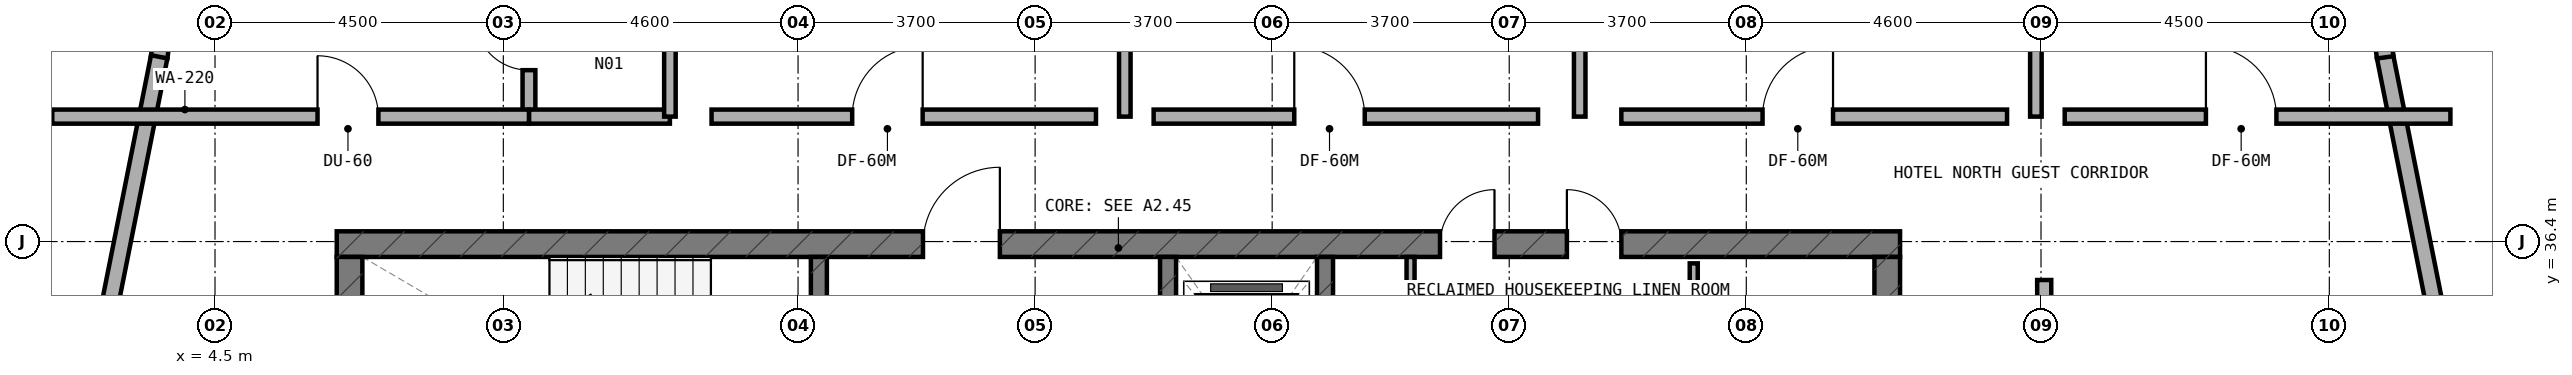
"""IFC4 building model, lengths in metres.
Left out: names, types, materials, properties, quantities, classifications, styles, units other than length and angle.
Written with IfcOpenShell. Run it as: python <this file> out.ifc"""

import sys

from ifc_helpers import new_model, si_unit, direction, frame, frame_2d, origin, place, context, subcontext, project, spatial, rectangle, extrude, element, fill, save


model = new_model("IFC4")
c1 = context("Model", 3, precision=1e-05, world=origin(), true_north=direction((0.0, 1.0)))
c2 = subcontext(c1, "Body", "Model", "MODEL_VIEW")
j1 = project(units=[si_unit("LENGTHUNIT", "METRE"), si_unit("PLANEANGLEUNIT", "RADIAN")], contexts=[c1])
p1 = place(None, origin())
s1 = spatial("IfcSite", under=j1, at=p1, CompositionType="ELEMENT")
p2 = place(p1, origin())
s2 = spatial("IfcBuilding", under=s1, at=p2, CompositionType="ELEMENT")
p3 = place(p2, frame((0.0, 0.0, 209.9)))
s3 = spatial("IfcBuildingStorey", under=s2, at=p3, CompositionType="ELEMENT", Elevation=209.9)
p4 = place(p3, frame((6.4, 36.36, 0.0), z_axis=(0.0, 0.0, 1.0), x_axis=(1.0, 0.0, 0.0)))
e1 = element("IfcWall", 1, at=p4, inside=s3, PredefinedType="SHEAR", context=c2, shape_type="SweptSolid", body=[
    extrude(rectangle(XDim=24.4, YDim=0.4, at=frame_2d((12.2, 0.0))), origin(), (0.0, 0.0, 1.0), 3.6),
])
p5 = place(p4, frame((9.15, 0.0, 0.0)))
e2 = element("IfcOpeningElement", 2, at=p5, cuts=e1, PredefinedType="OPENING", context=c2, shape_type="SweptSolid", body=[
    extrude(rectangle(XDim=1.2, YDim=2.15, at=frame_2d((0.6, 1.075))), frame((0.0, 0.21, 0.0), z_axis=(0.0, -1.0, 0.0), x_axis=(1.0, 0.0, 0.0)), (0.0, 0.0, 1.0), 0.42),
])
p6 = place(p4, frame((19.2, 0.0, 0.0)))
e3 = element("IfcOpeningElement", 3, at=p6, cuts=e1, PredefinedType="OPENING", context=c2, shape_type="SweptSolid", body=[
    extrude(rectangle(XDim=0.85, YDim=2.1, at=frame_2d((0.425, 1.05))), frame((0.0, 0.21, 0.0), z_axis=(0.0, -1.0, 0.0), x_axis=(1.0, 0.0, 0.0)), (0.0, 0.0, 1.0), 0.42),
])
p7 = place(p4, frame((17.22, 0.0, 0.0)))
e4 = element("IfcOpeningElement", 4, at=p7, cuts=e1, PredefinedType="OPENING", context=c2, shape_type="SweptSolid", body=[
    extrude(rectangle(XDim=0.85, YDim=2.1, at=frame_2d((0.425, 1.05))), frame((0.0, 0.21, 0.0), z_axis=(0.0, -1.0, 0.0), x_axis=(1.0, 0.0, 0.0)), (0.0, 0.0, 1.0), 0.42),
])
for number, where, z_axis, x_axis in (
    (5, (6.6, 33.0, 0.0), (0.0, 0.0, 1.0), (0.0, 1.0, 0.0)),
    (6, (30.6, 33.0, 0.0), (0.0, 0.0, 1.0), (0.0, 1.0, 0.0)),
):
    element("IfcWall", number, at=place(p3, frame(where, z_axis=z_axis, x_axis=x_axis)), inside=s3, PredefinedType="SHEAR", context=c2, shape_type="SweptSolid", body=[
        extrude(rectangle(XDim=3.16, YDim=0.4, at=frame_2d((1.58, 0.0))), origin(), (0.0, 0.0, 1.0), 3.6),
    ])
p8 = place(p3, frame((13.925, 33.0, 0.0), z_axis=(0.0, 0.0, 1.0), x_axis=(0.0, 1.0, 0.0)))
e7 = element("IfcWall", 7, at=p8, inside=s3, PredefinedType="STANDARD", context=c2, shape_type="SweptSolid", body=[
    extrude(rectangle(XDim=3.16, YDim=0.25, at=frame_2d((1.58, 0.0))), origin(), (0.0, 0.0, 1.0), 3.32),
])
p9 = place(p8, frame((0.98, 0.0, 0.0)))
e8 = element("IfcOpeningElement", 8, at=p9, cuts=e7, PredefinedType="OPENING", context=c2, shape_type="SweptSolid", body=[
    extrude(rectangle(XDim=1.1, YDim=2.15, at=frame_2d((0.55, 1.075))), frame((0.0, 0.135, 0.0), z_axis=(0.0, -1.0, 0.0), x_axis=(1.0, 0.0, 0.0)), (0.0, 0.0, 1.0), 0.27),
])
p10 = place(p3, frame((19.375, 33.0, 0.0), z_axis=(0.0, 0.0, 1.0), x_axis=(0.0, 1.0, 0.0)))
e9 = element("IfcWall", 9, at=p10, inside=s3, PredefinedType="STANDARD", context=c2, shape_type="SweptSolid", body=[
    extrude(rectangle(XDim=3.16, YDim=0.25, at=frame_2d((1.58, 0.0))), origin(), (0.0, 0.0, 1.0), 3.32),
])
p11 = place(p10, frame((0.98, 0.0, 0.0)))
e10 = element("IfcOpeningElement", 10, at=p11, cuts=e9, PredefinedType="OPENING", context=c2, shape_type="SweptSolid", body=[
    extrude(rectangle(XDim=1.1, YDim=2.15, at=frame_2d((0.55, 1.075))), frame((0.0, 0.135, 0.0), z_axis=(0.0, -1.0, 0.0), x_axis=(1.0, 0.0, 0.0)), (0.0, 0.0, 1.0), 0.27),
])
p12 = place(p3, frame((21.825, 33.0, 0.0), z_axis=(0.0, 0.0, 1.0), x_axis=(0.0, 1.0, 0.0)))
e11 = element("IfcWall", 11, at=p12, inside=s3, PredefinedType="STANDARD", context=c2, shape_type="SweptSolid", body=[
    extrude(rectangle(XDim=3.16, YDim=0.25, at=frame_2d((1.58, 0.0))), origin(), (0.0, 0.0, 1.0), 3.32),
])
p13 = place(p3, frame((40.084, 30.681, 0.0), z_axis=(0.0, 0.0, 1.0), x_axis=(-0.195291715883, 0.980745199176, 0.0)))
e12 = element("IfcWall", 12, at=p13, inside=s3, PredefinedType="STANDARD", context=c2, shape_type="SweptSolid", body=[
    extrude(rectangle(XDim=8.771, YDim=0.26, at=frame_2d((4.385, 0.0))), origin(), (0.0, 0.0, 1.0), 3.32),
])
p14 = place(p13, frame((2.798, 0.0, 0.85)))
e13 = element("IfcOpeningElement", 13, at=p14, cuts=e12, PredefinedType="OPENING", context=c2, shape_type="SweptSolid", body=[
    extrude(rectangle(XDim=2.1, YDim=1.5, at=frame_2d((1.05, 0.75))), frame((0.0, 0.14, 0.0), z_axis=(0.0, -1.0, 0.0), x_axis=(1.0, 0.0, 0.0)), (0.0, 0.0, 1.0), 0.28),
])
p15 = place(p3, frame((38.372, 39.275, 0.0), z_axis=(0.0, 0.0, 1.0), x_axis=(-0.130954667764, 0.9913883573, 0.0)))
e14 = element("IfcWall", 14, at=p15, inside=s3, PredefinedType="STANDARD", context=c2, shape_type="SweptSolid", body=[
    extrude(rectangle(XDim=0.833, YDim=0.26, at=frame_2d((0.417, 0.0))), origin(), (0.0, 0.0, 1.0), 3.32),
])
p16 = place(p3, frame((3.741, 40.136, 0.0), z_axis=(0.0, 0.0, 1.0), x_axis=(-0.130156359936, -0.991493480548, 0.0)))
e15 = element("IfcWall", 15, at=p16, inside=s3, PredefinedType="STANDARD", context=c2, shape_type="SweptSolid", body=[
    extrude(rectangle(XDim=0.868, YDim=0.26, at=frame_2d((0.434, 0.0))), origin(), (0.0, 0.0, 1.0), 3.32),
])
p17 = place(p3, frame((3.629, 39.283, 0.0), z_axis=(0.0, 0.0, 1.0), x_axis=(-0.195291715883, -0.980745199176, 0.0)))
e16 = element("IfcWall", 16, at=p17, inside=s3, PredefinedType="STANDARD", context=c2, shape_type="SweptSolid", body=[
    extrude(rectangle(XDim=8.771, YDim=0.26, at=frame_2d((4.385, 0.0))), origin(), (0.0, 0.0, 1.0), 3.32),
])
p18 = place(p17, frame((3.873, 0.0, 0.85)))
e17 = element("IfcOpeningElement", 17, at=p18, cuts=e16, PredefinedType="OPENING", context=c2, shape_type="SweptSolid", body=[
    extrude(rectangle(XDim=2.1, YDim=1.5, at=frame_2d((1.05, 0.75))), frame((0.0, 0.14, 0.0), z_axis=(0.0, -1.0, 0.0), x_axis=(1.0, 0.0, 0.0)), (0.0, 0.0, 1.0), 0.28),
])
p19 = place(p3, frame((27.58, 33.1, 0.0), z_axis=(0.0, 0.0, 1.0), x_axis=(0.0, 1.0, 0.0)))
e18 = element("IfcWall", 18, at=p19, inside=s3, PredefinedType="PARTITIONING", context=c2, shape_type="SweptSolid", body=[
    extrude(rectangle(XDim=2.96, YDim=0.125, at=frame_2d((1.48, 0.0))), origin(), (0.0, 0.0, 1.0), 3.32),
])
p20 = place(p19, frame((1.055, 0.0, 0.0)))
e19 = element("IfcOpeningElement", 19, at=p20, cuts=e18, PredefinedType="OPENING", context=c2, shape_type="SweptSolid", body=[
    extrude(rectangle(XDim=0.85, YDim=2.1, at=frame_2d((0.425, 1.05))), frame((0.0, 0.073, 0.0), z_axis=(0.0, -1.0, 0.0), x_axis=(1.0, 0.0, 0.0)), (0.0, 0.0, 1.0), 0.145),
])
p21 = place(p3, frame((23.16, 34.82, 0.0), z_axis=(0.0, 0.0, 1.0), x_axis=(0.0, 1.0, 0.0)))
e20 = element("IfcWall", 20, at=p21, inside=s3, PredefinedType="PARTITIONING", context=c2, shape_type="SweptSolid", body=[
    extrude(rectangle(XDim=1.34, YDim=0.125, at=frame_2d((0.67, 0.0))), origin(), (0.0, 0.0, 1.0), 3.32),
])
p22 = place(p3, frame((9.4, 38.45, 0.0), z_axis=(0.0, 0.0, 1.0), x_axis=(0.0, 1.0, 0.0)))
e21 = element("IfcWall", 21, at=p22, inside=s3, PredefinedType="PLUMBINGWALL", context=c2, shape_type="SweptSolid", body=[
    extrude(rectangle(XDim=2.1, YDim=0.2, at=frame_2d((1.05, 0.0))), origin(), (0.0, 0.0, 1.0), 2.935),
])
p23 = place(p22, frame((0.625, 0.0, 0.0)))
e22 = element("IfcOpeningElement", 22, at=p23, cuts=e21, PredefinedType="OPENING", context=c2, shape_type="SweptSolid", body=[
    extrude(rectangle(XDim=0.85, YDim=2.1, at=frame_2d((0.425, 1.05))), frame((0.0, 0.11, 0.0), z_axis=(0.0, -1.0, 0.0), x_axis=(1.0, 0.0, 0.0)), (0.0, 0.0, 1.0), 0.22),
])
p24 = place(p3, frame((9.4, 38.35, 0.0), z_axis=(0.0, 0.0, 1.0), x_axis=(1.0, 0.0, 0.0)))
e23 = element("IfcWall", 23, at=p24, inside=s3, PredefinedType="SOLIDWALL", context=c2, shape_type="SweptSolid", body=[
    extrude(rectangle(XDim=2.2, YDim=0.22, at=frame_2d((1.1, 0.0))), origin(), (0.0, 0.0, 1.0), 3.32),
])
p25 = place(p3, frame((1.96, 38.35, 0.0), z_axis=(0.0, 0.0, 1.0), x_axis=(1.0, 0.0, 0.0)))
e24 = element("IfcWall", 24, at=p25, inside=s3, PredefinedType="SOLIDWALL", context=c2, shape_type="SweptSolid", body=[
    extrude(rectangle(XDim=7.44, YDim=0.22, at=frame_2d((3.72, 0.0))), origin(), (0.0, 0.0, 1.0), 2.695),
])
p26 = place(p25, frame((4.14, 0.0, 0.0)))
e25 = element("IfcOpeningElement", 25, at=p26, cuts=e24, PredefinedType="OPENING", context=c2, shape_type="SweptSolid", body=[
    extrude(rectangle(XDim=0.95, YDim=2.1, at=frame_2d((0.475, 1.05))), frame((0.0, 0.12, 0.0), z_axis=(0.0, -1.0, 0.0), x_axis=(1.0, 0.0, 0.0)), (0.0, 0.0, 1.0), 0.24),
])
p27 = place(p3, frame((11.6, 38.35, 0.0), z_axis=(0.0, 0.0, 1.0), x_axis=(0.0, 1.0, 0.0)))
e26 = element("IfcWall", 26, at=p27, inside=s3, PredefinedType="SOLIDWALL", context=c2, shape_type="SweptSolid", body=[
    extrude(rectangle(XDim=5.064, YDim=0.18, at=frame_2d((2.532, 0.0))), origin(), (0.0, 0.0, 1.0), 2.935),
])
p28 = place(p3, frame((18.7, 38.35, 0.0), z_axis=(0.0, 0.0, 1.0), x_axis=(0.0, 1.0, 0.0)))
e27 = element("IfcWall", 27, at=p28, inside=s3, PredefinedType="SOLIDWALL", context=c2, shape_type="SweptSolid", body=[
    extrude(rectangle(XDim=5.79, YDim=0.18, at=frame_2d((2.895, 0.0))), origin(), (0.0, 0.0, 1.0), 2.935),
])
p29 = place(p3, frame((12.25, 38.35, 0.0), z_axis=(0.0, 0.0, 1.0), x_axis=(1.0, 0.0, 0.0)))
e28 = element("IfcWall", 28, at=p29, inside=s3, PredefinedType="SOLIDWALL", context=c2, shape_type="SweptSolid", body=[
    extrude(rectangle(XDim=6.0, YDim=0.22, at=frame_2d((3.0, 0.0))), origin(), (0.0, 0.0, 1.0), 2.695),
])
p30 = place(p29, frame((2.195, 0.0, 0.0)))
e29 = element("IfcOpeningElement", 29, at=p30, cuts=e28, PredefinedType="OPENING", context=c2, shape_type="SweptSolid", body=[
    extrude(rectangle(XDim=1.1, YDim=2.1, at=frame_2d((0.55, 1.05))), frame((0.0, 0.12, 0.0), z_axis=(0.0, -1.0, 0.0), x_axis=(1.0, 0.0, 0.0)), (0.0, 0.0, 1.0), 0.24),
])
p31 = place(p3, frame((19.15, 38.35, 0.0), z_axis=(0.0, 0.0, 1.0), x_axis=(1.0, 0.0, 0.0)))
e30 = element("IfcWall", 30, at=p31, inside=s3, PredefinedType="SOLIDWALL", context=c2, shape_type="SweptSolid", body=[
    extrude(rectangle(XDim=6.0, YDim=0.22, at=frame_2d((3.0, 0.0))), origin(), (0.0, 0.0, 1.0), 3.32),
])
p32 = place(p31, frame((2.195, 0.0, 0.0)))
e31 = element("IfcOpeningElement", 31, at=p32, cuts=e30, PredefinedType="OPENING", context=c2, shape_type="SweptSolid", body=[
    extrude(rectangle(XDim=1.1, YDim=2.1, at=frame_2d((0.55, 1.05))), frame((0.0, 0.12, 0.0), z_axis=(0.0, -1.0, 0.0), x_axis=(1.0, 0.0, 0.0)), (0.0, 0.0, 1.0), 0.24),
])
p33 = place(p3, frame((25.8, 38.35, 0.0), z_axis=(0.0, 0.0, 1.0), x_axis=(0.0, 1.0, 0.0)))
e32 = element("IfcWall", 32, at=p33, inside=s3, PredefinedType="SOLIDWALL", context=c2, shape_type="SweptSolid", body=[
    extrude(rectangle(XDim=5.79, YDim=0.18, at=frame_2d((2.895, 0.0))), origin(), (0.0, 0.0, 1.0), 2.695),
])
p34 = place(p3, frame((32.92, 38.35, 0.0), z_axis=(0.0, 0.0, 1.0), x_axis=(0.0, 1.0, 0.0)))
e33 = element("IfcWall", 33, at=p34, inside=s3, PredefinedType="SOLIDWALL", context=c2, shape_type="SweptSolid", body=[
    extrude(rectangle(XDim=4.563, YDim=0.18, at=frame_2d((2.281, 0.0))), origin(), (0.0, 0.0, 1.0), 2.935),
])
p35 = place(p3, frame((26.45, 38.35, 0.0), z_axis=(0.0, 0.0, 1.0), x_axis=(1.0, 0.0, 0.0)))
e34 = element("IfcWall", 34, at=p35, inside=s3, PredefinedType="SOLIDWALL", context=c2, shape_type="SweptSolid", body=[
    extrude(rectangle(XDim=6.02, YDim=0.22, at=frame_2d((3.01, 0.0))), origin(), (0.0, 0.0, 1.0), 2.695),
])
p36 = place(p35, frame((2.204, 0.0, 0.0)))
e35 = element("IfcOpeningElement", 35, at=p36, cuts=e34, PredefinedType="OPENING", context=c2, shape_type="SweptSolid", body=[
    extrude(rectangle(XDim=1.1, YDim=2.1, at=frame_2d((0.55, 1.05))), frame((0.0, 0.12, 0.0), z_axis=(0.0, -1.0, 0.0), x_axis=(1.0, 0.0, 0.0)), (0.0, 0.0, 1.0), 0.24),
])
p37 = place(p3, frame((33.37, 38.35, 0.0), z_axis=(0.0, 0.0, 1.0), x_axis=(1.0, 0.0, 0.0)))
e36 = element("IfcWall", 36, at=p37, inside=s3, PredefinedType="SOLIDWALL", context=c2, shape_type="SweptSolid", body=[
    extrude(rectangle(XDim=6.02, YDim=0.22, at=frame_2d((3.01, 0.0))), origin(), (0.0, 0.0, 1.0), 2.695),
])
p38 = place(p37, frame((2.204, 0.0, 0.0)))
e37 = element("IfcOpeningElement", 37, at=p38, cuts=e36, PredefinedType="OPENING", context=c2, shape_type="SweptSolid", body=[
    extrude(rectangle(XDim=1.1, YDim=2.1, at=frame_2d((0.55, 1.05))), frame((0.0, 0.12, 0.0), z_axis=(0.0, -1.0, 0.0), x_axis=(1.0, 0.0, 0.0)), (0.0, 0.0, 1.0), 0.24),
])
p39 = place(p3, frame((33.05, 31.088, 0.0), z_axis=(0.0, 0.0, 1.0), x_axis=(0.0, 1.0, 0.0)))
e38 = element("IfcWall", 38, at=p39, inside=s3, PredefinedType="SOLIDWALL", context=c2, shape_type="SweptSolid", body=[
    extrude(rectangle(XDim=4.712, YDim=0.22, at=frame_2d((2.356, 0.0))), origin(), (0.0, 0.0, 1.0), 2.695),
])
p40 = place(p39, frame((1.881, 0.0, 0.0)))
e39 = element("IfcOpeningElement", 39, at=p40, cuts=e38, PredefinedType="OPENING", context=c2, shape_type="SweptSolid", body=[
    extrude(rectangle(XDim=0.95, YDim=2.1, at=frame_2d((0.475, 1.05))), frame((0.0, 0.12, 0.0), z_axis=(0.0, -1.0, 0.0), x_axis=(1.0, 0.0, 0.0)), (0.0, 0.0, 1.0), 0.24),
])
p41 = place(p5, origin())
e40 = element("IfcDoor", 40, at=p41, inside=s3, OperationType="SINGLE_SWING_RIGHT", PredefinedType="DOOR", context=c2, shape_type="SweptSolid", body=[
    extrude(rectangle(XDim=1.2, YDim=2.15, at=frame_2d((0.6, 1.075))), frame((0.0, 0.025, 0.0), z_axis=(0.0, -1.0, 0.0), x_axis=(1.0, 0.0, 0.0)), (0.0, 0.0, 1.0), 0.05),
])
fill(e2, e40)
p42 = place(p6, origin())
e41 = element("IfcDoor", 41, at=p42, inside=s3, OperationType="SINGLE_SWING_LEFT", PredefinedType="DOOR", context=c2, shape_type="SweptSolid", body=[
    extrude(rectangle(XDim=0.85, YDim=2.1, at=frame_2d((0.425, 1.05))), frame((0.0, 0.025, 0.0), z_axis=(0.0, -1.0, 0.0), x_axis=(1.0, 0.0, 0.0)), (0.0, 0.0, 1.0), 0.05),
])
fill(e3, e41)
p43 = place(p7, origin())
e42 = element("IfcDoor", 42, at=p43, inside=s3, OperationType="SINGLE_SWING_RIGHT", PredefinedType="DOOR", context=c2, shape_type="SweptSolid", body=[
    extrude(rectangle(XDim=0.85, YDim=2.1, at=frame_2d((0.425, 1.05))), frame((0.0, 0.025, 0.0), z_axis=(0.0, -1.0, 0.0), x_axis=(1.0, 0.0, 0.0)), (0.0, 0.0, 1.0), 0.05),
])
fill(e4, e42)
p44 = place(p23, origin())
e43 = element("IfcDoor", 43, at=p44, inside=s3, OperationType="SINGLE_SWING_RIGHT", PredefinedType="DOOR", context=c2, shape_type="SweptSolid", body=[
    extrude(rectangle(XDim=0.85, YDim=2.1, at=frame_2d((0.425, 1.05))), frame((0.0, 0.025, 0.0), z_axis=(0.0, -1.0, 0.0), x_axis=(1.0, 0.0, 0.0)), (0.0, 0.0, 1.0), 0.05),
])
fill(e22, e43)
p45 = place(p26, origin())
e44 = element("IfcDoor", 44, at=p45, inside=s3, OperationType="SINGLE_SWING_LEFT", PredefinedType="DOOR", context=c2, shape_type="SweptSolid", body=[
    extrude(rectangle(XDim=0.95, YDim=2.1, at=frame_2d((0.475, 1.05))), frame((0.0, 0.025, 0.0), z_axis=(0.0, -1.0, 0.0), x_axis=(1.0, 0.0, 0.0)), (0.0, 0.0, 1.0), 0.05),
])
fill(e25, e44)
p46 = place(p30, origin())
e45 = element("IfcDoor", 45, at=p46, inside=s3, OperationType="SINGLE_SWING_RIGHT", PredefinedType="DOOR", context=c2, shape_type="SweptSolid", body=[
    extrude(rectangle(XDim=1.1, YDim=2.1, at=frame_2d((0.55, 1.05))), frame((0.0, 0.025, 0.0), z_axis=(0.0, -1.0, 0.0), x_axis=(1.0, 0.0, 0.0)), (0.0, 0.0, 1.0), 0.05),
])
fill(e29, e45)
p47 = place(p32, origin())
e46 = element("IfcDoor", 46, at=p47, inside=s3, OperationType="SINGLE_SWING_LEFT", PredefinedType="DOOR", context=c2, shape_type="SweptSolid", body=[
    extrude(rectangle(XDim=1.1, YDim=2.1, at=frame_2d((0.55, 1.05))), frame((0.0, 0.025, 0.0), z_axis=(0.0, -1.0, 0.0), x_axis=(1.0, 0.0, 0.0)), (0.0, 0.0, 1.0), 0.05),
])
fill(e31, e46)
p48 = place(p36, origin())
e47 = element("IfcDoor", 47, at=p48, inside=s3, OperationType="SINGLE_SWING_RIGHT", PredefinedType="DOOR", context=c2, shape_type="SweptSolid", body=[
    extrude(rectangle(XDim=1.1, YDim=2.1, at=frame_2d((0.55, 1.05))), frame((0.0, 0.025, 0.0), z_axis=(0.0, -1.0, 0.0), x_axis=(1.0, 0.0, 0.0)), (0.0, 0.0, 1.0), 0.05),
])
fill(e35, e47)
p49 = place(p38, origin())
e48 = element("IfcDoor", 48, at=p49, inside=s3, OperationType="SINGLE_SWING_LEFT", PredefinedType="DOOR", context=c2, shape_type="SweptSolid", body=[
    extrude(rectangle(XDim=1.1, YDim=2.1, at=frame_2d((0.55, 1.05))), frame((0.0, 0.025, 0.0), z_axis=(0.0, -1.0, 0.0), x_axis=(1.0, 0.0, 0.0)), (0.0, 0.0, 1.0), 0.05),
])
fill(e37, e48)
save(model, sys.argv[1])
